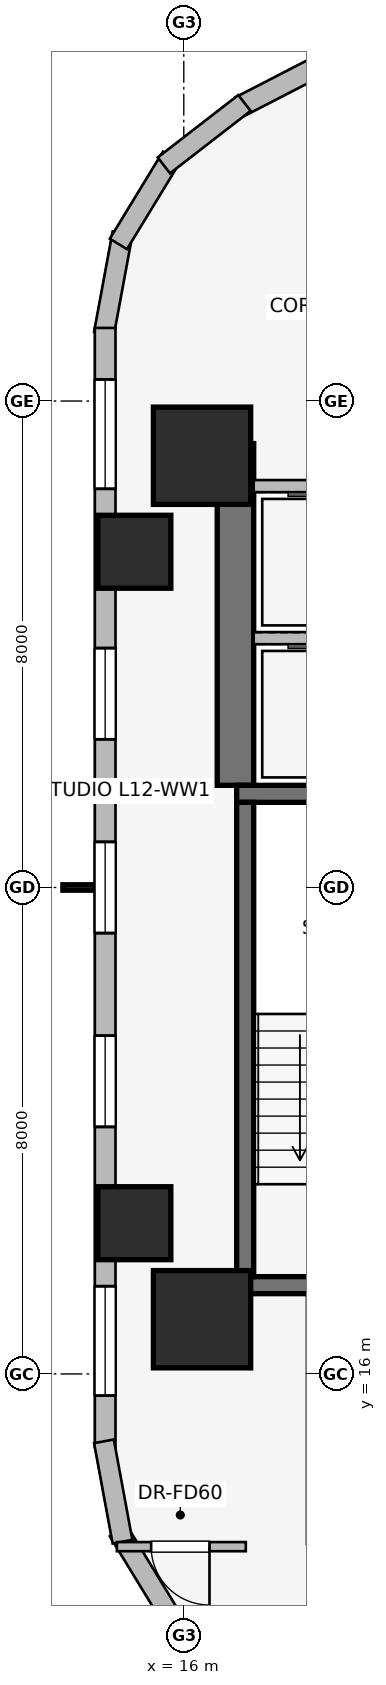
"""IFC4 building model, lengths in metres.
Left out: names, types, materials, properties, quantities, classifications, styles, units other than length and angle.
Written with IfcOpenShell. Run it as: python <this file> out.ifc"""

import sys

from ifc_helpers import new_model, si_unit, direction, frame, frame_2d, origin, origin_2d, place, context, subcontext, project, spatial, rectangle, extrude, element, fill, save


model = new_model("IFC4")
c1 = context("Model", 3, precision=1e-05, world=origin(), true_north=direction((0.0, 1.0)))
c2 = subcontext(c1, "Body", "Model", "MODEL_VIEW")
j1 = project(units=[si_unit("LENGTHUNIT", "METRE"), si_unit("PLANEANGLEUNIT", "RADIAN")], contexts=[c1])
p1 = place(None, origin())
s1 = spatial("IfcSite", under=j1, at=p1, CompositionType="ELEMENT")
p2 = place(p1, origin())
s2 = spatial("IfcBuilding", under=s1, at=p2, CompositionType="ELEMENT")
p3 = place(p2, frame((0.0, 0.0, 48.9)))
s3 = spatial("IfcBuildingStorey", under=s2, at=p3, CompositionType="ELEMENT", Elevation=48.9)
p4 = place(p3, frame((16.85, 25.68, 0.0), z_axis=(0.0, 0.0, 1.0), x_axis=(0.0, 1.0, 0.0)))
e1 = element("IfcWall", 1, at=p4, inside=s3, PredefinedType="SHEAR", context=c2, shape_type="SweptSolid", body=[
    extrude(rectangle(XDim=5.62, YDim=0.6, at=frame_2d((2.81, 0.0))), origin(), (0.0, 0.0, 1.0), 3.65),
])
for number, where, z_axis, x_axis in (
    (2, (16.87, 17.46, 0.0), (0.0, 0.0, 1.0), (1.0, 0.0, 0.0)),
    (3, (20.63, 25.54, 0.0), (0.0, 0.0, 1.0), (-1.0, 0.0, 0.0)),
):
    element("IfcWall", number, at=place(p3, frame(where, z_axis=z_axis, x_axis=x_axis)), inside=s3, PredefinedType="SHEAR", context=c2, shape_type="SweptSolid", body=[
        extrude(rectangle(XDim=3.76, YDim=0.28, at=frame_2d((1.88, 0.0))), origin(), (0.0, 0.0, 1.0), 3.65),
    ])
p5 = place(p3, frame((17.01, 25.4, 0.0), z_axis=(0.0, 0.0, 1.0), x_axis=(0.0, -1.0, 0.0)))
e4 = element("IfcWall", 4, at=p5, inside=s3, PredefinedType="SHEAR", context=c2, shape_type="SweptSolid", body=[
    extrude(rectangle(XDim=7.8, YDim=0.28, at=frame_2d((3.9, 0.0))), origin(), (0.0, 0.0, 1.0), 3.65),
])
for number, where, z_axis, x_axis in (
    (5, (16.3, 16.9, 0.0), (0.0, 0.0, 1.0), (1.0, 0.0, 0.0)),
    (6, (16.3, 31.1, 0.0), (0.0, 0.0, 1.0), (1.0, 0.0, 0.0)),
):
    element("IfcColumn", number, at=place(p3, frame(where, z_axis=z_axis, x_axis=x_axis)), inside=s3, PredefinedType="COLUMN", context=c2, shape_type="SweptSolid", body=[
        extrude(rectangle(XDim=1.6, YDim=1.6, at=origin_2d()), origin(), (0.0, 0.0, 1.0), 3.65),
    ])
for number, where, z_axis, x_axis in (
    (7, (15.187, 29.521, 0.0), (0.0, 0.0, 1.0), (1.0, 0.0, 0.0)),
    (8, (15.187, 18.479, 0.0), (0.0, 0.0, 1.0), (1.0, 0.0, 0.0)),
):
    element("IfcColumn", number, at=place(p3, frame(where, z_axis=z_axis, x_axis=x_axis)), inside=s3, PredefinedType="COLUMN", context=c2, shape_type="SweptSolid", body=[
        extrude(rectangle(XDim=1.2, YDim=1.2, at=origin_2d()), origin(), (0.0, 0.0, 1.0), 3.65),
    ])
p6 = place(p3, frame((16.924, 36.841, 0.0), z_axis=(0.0, 0.0, 1.0), x_axis=(0.888634413993, 0.458616264721, 0.0)))
e9 = element("IfcWall", 9, at=p6, inside=s3, PredefinedType="STANDARD", context=c2, shape_type="SweptSolid", body=[
    extrude(rectangle(XDim=20.531, YDim=0.34, at=frame_2d((10.266, 0.0))), origin(), (0.0, 0.0, 1.0), 2.654),
])
p7 = place(p6, frame((2.161, 0.0, 0.75)))
e10 = element("IfcOpeningElement", 10, at=p7, cuts=e9, PredefinedType="OPENING", context=c2, shape_type="SweptSolid", body=[
    extrude(rectangle(XDim=1.05, YDim=1.4, at=frame_2d((0.525, 0.7))), frame((0.0, 0.18, 0.0), z_axis=(0.0, -1.0, 0.0), x_axis=(1.0, 0.0, 0.0)), (0.0, 0.0, 1.0), 0.36),
])
p8 = place(p6, frame((5.903, 0.0, 0.75)))
e11 = element("IfcOpeningElement", 11, at=p8, cuts=e9, PredefinedType="OPENING", context=c2, shape_type="SweptSolid", body=[
    extrude(rectangle(XDim=1.5, YDim=1.5, at=frame_2d((0.75, 0.75))), frame((0.0, 0.18, 0.0), z_axis=(0.0, -1.0, 0.0), x_axis=(1.0, 0.0, 0.0)), (0.0, 0.0, 1.0), 0.36),
])
p9 = place(p6, frame((9.516, 0.0, 0.75)))
e12 = element("IfcOpeningElement", 12, at=p9, cuts=e9, PredefinedType="OPENING", context=c2, shape_type="SweptSolid", body=[
    extrude(rectangle(XDim=1.5, YDim=1.5, at=frame_2d((0.75, 0.75))), frame((0.0, 0.18, 0.0), z_axis=(0.0, -1.0, 0.0), x_axis=(1.0, 0.0, 0.0)), (0.0, 0.0, 1.0), 0.36),
])
p10 = place(p6, frame((13.129, 0.0, 0.75)))
e13 = element("IfcOpeningElement", 13, at=p10, cuts=e9, PredefinedType="OPENING", context=c2, shape_type="SweptSolid", body=[
    extrude(rectangle(XDim=1.5, YDim=1.5, at=frame_2d((0.75, 0.75))), frame((0.0, 0.18, 0.0), z_axis=(0.0, -1.0, 0.0), x_axis=(1.0, 0.0, 0.0)), (0.0, 0.0, 1.0), 0.36),
])
p11 = place(p6, frame((17.476, 0.0, 0.75)))
e14 = element("IfcOpeningElement", 14, at=p11, cuts=e9, PredefinedType="OPENING", context=c2, shape_type="SweptSolid", body=[
    extrude(rectangle(XDim=1.05, YDim=1.4, at=frame_2d((0.525, 0.7))), frame((0.0, 0.18, 0.0), z_axis=(0.0, -1.0, 0.0), x_axis=(1.0, 0.0, 0.0)), (0.0, 0.0, 1.0), 0.36),
])
p12 = place(p3, frame((14.687, 33.108, 0.0), z_axis=(0.0, 0.0, 1.0), x_axis=(0.181714143354, 0.983351397063, 0.0)))
e15 = element("IfcWall", 15, at=p12, inside=s3, PredefinedType="STANDARD", context=c2, shape_type="SweptSolid", body=[
    extrude(rectangle(XDim=1.678, YDim=0.33, at=frame_2d((0.839, 0.0))), origin(), (0.0, 0.0, 1.0), 3.36),
])
p13 = place(p3, frame((14.925, 34.583, 0.0), z_axis=(0.0, 0.0, 1.0), x_axis=(0.520584129191, 0.853810379671, 0.0)))
e16 = element("IfcWall", 16, at=p13, inside=s3, PredefinedType="STANDARD", context=c2, shape_type="SweptSolid", body=[
    extrude(rectangle(XDim=1.677, YDim=0.33, at=frame_2d((0.838, 0.0))), origin(), (0.0, 0.0, 1.0), 3.36),
])
p14 = place(p3, frame((15.673, 35.875, 0.0), z_axis=(0.0, 0.0, 1.0), x_axis=(0.790691856293, 0.61221433207, 0.0)))
e17 = element("IfcWall", 17, at=p14, inside=s3, PredefinedType="STANDARD", context=c2, shape_type="SweptSolid", body=[
    extrude(rectangle(XDim=1.676, YDim=0.33, at=frame_2d((0.838, 0.0))), origin(), (0.0, 0.0, 1.0), 3.36),
])
p15 = place(p3, frame((14.707, 14.798, 0.0), z_axis=(0.0, 0.0, 1.0), x_axis=(0.0, 1.0, 0.0)))
e18 = element("IfcWall", 18, at=p15, inside=s3, PredefinedType="STANDARD", context=c2, shape_type="SweptSolid", body=[
    extrude(rectangle(XDim=18.404, YDim=0.34, at=frame_2d((9.202, 0.0))), origin(), (0.0, 0.0, 1.0), 2.654),
])
p16 = place(p15, frame((0.845, 0.0, 0.75)))
e19 = element("IfcOpeningElement", 19, at=p16, cuts=e18, PredefinedType="OPENING", context=c2, shape_type="SweptSolid", body=[
    extrude(rectangle(XDim=1.8, YDim=1.5, at=frame_2d((0.9, 0.75))), frame((0.0, 0.18, 0.0), z_axis=(0.0, -1.0, 0.0), x_axis=(1.0, 0.0, 0.0)), (0.0, 0.0, 1.0), 0.36),
])
p17 = place(p15, frame((5.265, 0.0, 0.75)))
e20 = element("IfcOpeningElement", 20, at=p17, cuts=e18, PredefinedType="OPENING", context=c2, shape_type="SweptSolid", body=[
    extrude(rectangle(XDim=1.5, YDim=1.5, at=frame_2d((0.75, 0.75))), frame((0.0, 0.18, 0.0), z_axis=(0.0, -1.0, 0.0), x_axis=(1.0, 0.0, 0.0)), (0.0, 0.0, 1.0), 0.36),
])
p18 = place(p15, frame((8.452, 0.0, 0.75)))
e21 = element("IfcOpeningElement", 21, at=p18, cuts=e18, PredefinedType="OPENING", context=c2, shape_type="SweptSolid", body=[
    extrude(rectangle(XDim=1.5, YDim=1.5, at=frame_2d((0.75, 0.75))), frame((0.0, 0.18, 0.0), z_axis=(0.0, -1.0, 0.0), x_axis=(1.0, 0.0, 0.0)), (0.0, 0.0, 1.0), 0.36),
])
p19 = place(p15, frame((11.639, 0.0, 0.75)))
e22 = element("IfcOpeningElement", 22, at=p19, cuts=e18, PredefinedType="OPENING", context=c2, shape_type="SweptSolid", body=[
    extrude(rectangle(XDim=1.5, YDim=1.5, at=frame_2d((0.75, 0.75))), frame((0.0, 0.18, 0.0), z_axis=(0.0, -1.0, 0.0), x_axis=(1.0, 0.0, 0.0)), (0.0, 0.0, 1.0), 0.36),
])
p20 = place(p15, frame((15.758, 0.0, 0.75)))
e23 = element("IfcOpeningElement", 23, at=p20, cuts=e18, PredefinedType="OPENING", context=c2, shape_type="SweptSolid", body=[
    extrude(rectangle(XDim=1.8, YDim=1.5, at=frame_2d((0.9, 0.75))), frame((0.0, 0.18, 0.0), z_axis=(0.0, -1.0, 0.0), x_axis=(1.0, 0.0, 0.0)), (0.0, 0.0, 1.0), 0.36),
])
p21 = place(p3, frame((16.998, 11.099, 0.0), z_axis=(0.0, 0.0, 1.0), x_axis=(-0.790691856293, 0.61221433207, 0.0)))
e24 = element("IfcWall", 24, at=p21, inside=s3, PredefinedType="STANDARD", context=c2, shape_type="SweptSolid", body=[
    extrude(rectangle(XDim=1.676, YDim=0.33, at=frame_2d((0.838, 0.0))), origin(), (0.0, 0.0, 1.0), 3.36),
])
p22 = place(p3, frame((15.798, 11.985, 0.0), z_axis=(0.0, 0.0, 1.0), x_axis=(-0.520584129191, 0.853810379671, 0.0)))
e25 = element("IfcWall", 25, at=p22, inside=s3, PredefinedType="STANDARD", context=c2, shape_type="SweptSolid", body=[
    extrude(rectangle(XDim=1.677, YDim=0.33, at=frame_2d((0.838, 0.0))), origin(), (0.0, 0.0, 1.0), 3.36),
])
p23 = place(p3, frame((14.992, 13.242, 0.0), z_axis=(0.0, 0.0, 1.0), x_axis=(-0.181714143354, 0.983351397063, 0.0)))
e26 = element("IfcWall", 26, at=p23, inside=s3, PredefinedType="STANDARD", context=c2, shape_type="SweptSolid", body=[
    extrude(rectangle(XDim=1.678, YDim=0.33, at=frame_2d((0.839, 0.0))), origin(), (0.0, 0.0, 1.0), 3.36),
])
p24 = place(p3, frame((17.15, 28.1, 0.0), z_axis=(0.0, 0.0, 1.0), x_axis=(1.0, 0.0, 0.0)))
e27 = element("IfcWall", 27, at=p24, inside=s3, PredefinedType="PARTITIONING", context=c2, shape_type="SweptSolid", body=[
    extrude(rectangle(XDim=2.5, YDim=0.2, at=frame_2d((1.25, 0.0))), origin(), (0.0, 0.0, 1.0), 3.36),
])
p25 = place(p3, frame((19.65, 30.6, 0.0), z_axis=(0.0, 0.0, 1.0), x_axis=(-1.0, 0.0, 0.0)))
e28 = element("IfcWall", 28, at=p25, inside=s3, PredefinedType="PARTITIONING", context=c2, shape_type="SweptSolid", body=[
    extrude(rectangle(XDim=2.5, YDim=0.2, at=frame_2d((1.25, 0.0))), origin(), (0.0, 0.0, 1.0), 2.26),
])
p26 = place(p3, frame((17.02, 13.16, 0.0), z_axis=(0.0, 0.0, 1.0), x_axis=(-1.0, 0.0, 0.0)))
e29 = element("IfcWall", 29, at=p26, inside=s3, PredefinedType="PARTITIONING", context=c2, shape_type="SweptSolid", body=[
    extrude(rectangle(XDim=2.12, YDim=0.15, at=frame_2d((1.06, 0.0))), origin(), (0.0, 0.0, 1.0), 3.36),
])
p27 = place(p26, frame((0.597, 0.0, 0.0)))
e30 = element("IfcOpeningElement", 30, at=p27, cuts=e29, PredefinedType="OPENING", context=c2, shape_type="SweptSolid", body=[
    extrude(rectangle(XDim=0.96, YDim=2.0, at=frame_2d((0.48, 1.0))), frame((0.0, 0.085, 0.0), z_axis=(0.0, -1.0, 0.0), x_axis=(1.0, 0.0, 0.0)), (0.0, 0.0, 1.0), 0.17),
])
p28 = place(p16, origin())
e31 = element("IfcWindow", 31, at=p28, inside=s3, PartitioningType="SINGLE_PANEL", PredefinedType="WINDOW", context=c2, shape_type="SweptSolid", body=[
    extrude(rectangle(XDim=1.8, YDim=1.5, at=frame_2d((0.9, 0.75))), frame((0.0, 0.03, 0.0), z_axis=(0.0, -1.0, 0.0), x_axis=(1.0, 0.0, 0.0)), (0.0, 0.0, 1.0), 0.06),
])
fill(e19, e31)
p29 = place(p17, origin())
e32 = element("IfcWindow", 32, at=p29, inside=s3, PartitioningType="SINGLE_PANEL", PredefinedType="WINDOW", context=c2, shape_type="SweptSolid", body=[
    extrude(rectangle(XDim=1.5, YDim=1.5, at=frame_2d((0.75, 0.75))), frame((0.0, 0.03, 0.0), z_axis=(0.0, -1.0, 0.0), x_axis=(1.0, 0.0, 0.0)), (0.0, 0.0, 1.0), 0.06),
])
fill(e20, e32)
p30 = place(p18, origin())
e33 = element("IfcWindow", 33, at=p30, inside=s3, PartitioningType="SINGLE_PANEL", PredefinedType="WINDOW", context=c2, shape_type="SweptSolid", body=[
    extrude(rectangle(XDim=1.5, YDim=1.5, at=frame_2d((0.75, 0.75))), frame((0.0, 0.03, 0.0), z_axis=(0.0, -1.0, 0.0), x_axis=(1.0, 0.0, 0.0)), (0.0, 0.0, 1.0), 0.06),
])
fill(e21, e33)
p31 = place(p19, origin())
e34 = element("IfcWindow", 34, at=p31, inside=s3, PartitioningType="SINGLE_PANEL", PredefinedType="WINDOW", context=c2, shape_type="SweptSolid", body=[
    extrude(rectangle(XDim=1.5, YDim=1.5, at=frame_2d((0.75, 0.75))), frame((0.0, 0.03, 0.0), z_axis=(0.0, -1.0, 0.0), x_axis=(1.0, 0.0, 0.0)), (0.0, 0.0, 1.0), 0.06),
])
fill(e22, e34)
p32 = place(p20, origin())
e35 = element("IfcWindow", 35, at=p32, inside=s3, PartitioningType="SINGLE_PANEL", PredefinedType="WINDOW", context=c2, shape_type="SweptSolid", body=[
    extrude(rectangle(XDim=1.8, YDim=1.5, at=frame_2d((0.9, 0.75))), frame((0.0, 0.03, 0.0), z_axis=(0.0, -1.0, 0.0), x_axis=(1.0, 0.0, 0.0)), (0.0, 0.0, 1.0), 0.06),
])
fill(e23, e35)
p33 = place(p27, origin())
e36 = element("IfcDoor", 36, at=p33, inside=s3, OperationType="SINGLE_SWING_LEFT", PredefinedType="DOOR", context=c2, shape_type="SweptSolid", body=[
    extrude(rectangle(XDim=0.96, YDim=2.0, at=frame_2d((0.48, 1.0))), frame((0.0, 0.025, 0.0), z_axis=(0.0, -1.0, 0.0), x_axis=(1.0, 0.0, 0.0)), (0.0, 0.0, 1.0), 0.05),
])
fill(e30, e36)
save(model, sys.argv[1])
